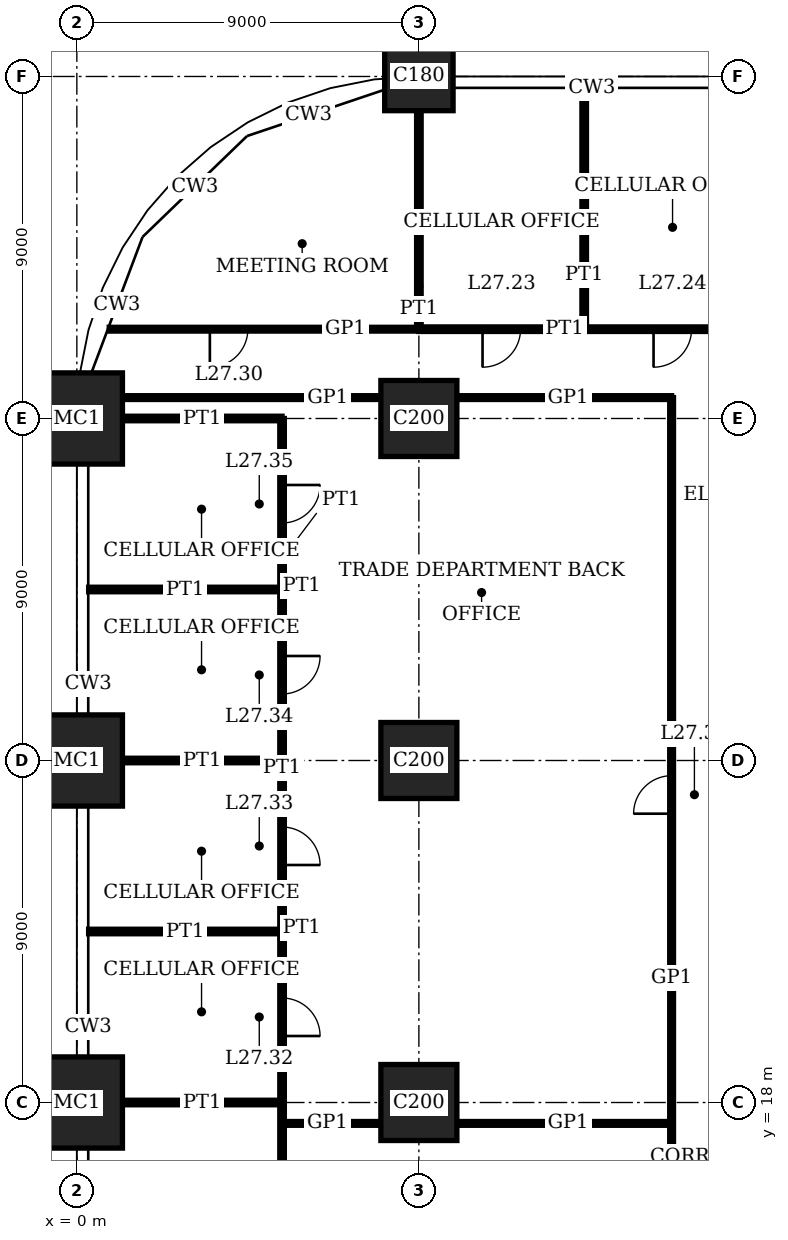
"""IFC4 building model, lengths in metres.
Left out: names, types, materials, properties, quantities, classifications, styles, units other than length and angle.
Written with IfcOpenShell. Run it as: python <this file> out.ifc"""

import sys

from ifc_helpers import new_model, si_unit, direction, frame, frame_2d, origin, origin_2d, place, context, subcontext, project, spatial, rectangle, extrude, element, fill, save


model = new_model("IFC4")
c1 = context("Model", 3, precision=1e-05, world=origin(), true_north=direction((0.0, 1.0)))
c2 = subcontext(c1, "Body", "Model", "MODEL_VIEW")
j1 = project(units=[si_unit("LENGTHUNIT", "METRE"), si_unit("PLANEANGLEUNIT", "RADIAN")], contexts=[c1])
p1 = place(None, origin())
s1 = spatial("IfcSite", under=j1, at=p1, CompositionType="ELEMENT")
p2 = place(p1, origin())
s2 = spatial("IfcBuilding", under=s1, at=p2, CompositionType="ELEMENT")
p3 = place(p2, frame((0.0, 0.0, 113.0)))
s3 = spatial("IfcBuildingStorey", under=s2, at=p3, CompositionType="ELEMENT", Elevation=113.0)
for number, where, z_axis, x_axis in (
    (1, (0.0, 18.0, 0.0), (0.0, 0.0, 1.0), (1.0, 0.0, 0.0)),
    (2, (0.0, 27.0, 0.0), (0.0, 0.0, 1.0), (1.0, 0.0, 0.0)),
    (3, (0.0, 36.0, 0.0), (0.0, 0.0, 1.0), (1.0, 0.0, 0.0)),
):
    element("IfcColumn", number, at=place(p3, frame(where, z_axis=z_axis, x_axis=x_axis)), inside=s3, PredefinedType="COLUMN", context=c2, shape_type="SweptSolid", body=[
        extrude(rectangle(XDim=2.4, YDim=2.4, at=origin_2d()), origin(), (0.0, 0.0, 1.0), 4.0),
    ])
for number, where, z_axis, x_axis in (
    (4, (9.0, 18.0, 0.0), (0.0, 0.0, 1.0), (1.0, 0.0, 0.0)),
    (5, (9.0, 27.0, 0.0), (0.0, 0.0, 1.0), (1.0, 0.0, 0.0)),
    (6, (9.0, 36.0, 0.0), (0.0, 0.0, 1.0), (1.0, 0.0, 0.0)),
):
    element("IfcColumn", number, at=place(p3, frame(where, z_axis=z_axis, x_axis=x_axis)), inside=s3, PredefinedType="COLUMN", context=c2, shape_type="SweptSolid", body=[
        extrude(rectangle(XDim=2.0, YDim=2.0, at=origin_2d()), origin(), (0.0, 0.0, 1.0), 4.0),
    ])
p4 = place(p3, frame((9.0, 45.0, 0.0), z_axis=(0.0, 0.0, 1.0), x_axis=(1.0, 0.0, 0.0)))
e7 = element("IfcColumn", 7, at=p4, inside=s3, PredefinedType="COLUMN", context=c2, shape_type="SweptSolid", body=[
    extrude(rectangle(XDim=1.8, YDim=1.8, at=origin_2d()), origin(), (0.0, 0.0, 1.0), 4.0),
])
p5 = place(p3, frame((5.39, 17.45, 0.0), z_axis=(0.0, 0.0, 1.0), x_axis=(1.0, 0.0, 0.0)))
e8 = element("IfcWall", 8, at=p5, inside=s3, PredefinedType="PARTITIONING", context=c2, shape_type="SweptSolid", body=[
    extrude(rectangle(XDim=2.61, YDim=0.1, at=frame_2d((1.305, 0.0))), origin(), (0.0, 0.0, 1.0), 3.75),
])
p6 = place(p3, frame((10.0, 17.45, 0.0), z_axis=(0.0, 0.0, 1.0), x_axis=(1.0, 0.0, 0.0)))
e9 = element("IfcWall", 9, at=p6, inside=s3, PredefinedType="PARTITIONING", context=c2, shape_type="SweptSolid", body=[
    extrude(rectangle(XDim=5.65, YDim=0.1, at=frame_2d((2.825, 0.0))), origin(), (0.0, 0.0, 1.0), 3.75),
])
p7 = place(p3, frame((1.2, 18.0, 0.0), z_axis=(0.0, 0.0, 1.0), x_axis=(1.0, 0.0, 0.0)))
e10 = element("IfcWall", 10, at=p7, inside=s3, PredefinedType="PARTITIONING", context=c2, shape_type="SweptSolid", body=[
    extrude(rectangle(XDim=4.2, YDim=0.12, at=frame_2d((2.1, 0.0))), origin(), (0.0, 0.0, 1.0), 3.05),
])
p8 = place(p3, frame((0.31, 22.5, 0.0), z_axis=(0.0, 0.0, 1.0), x_axis=(1.0, 0.0, 0.0)))
e11 = element("IfcWall", 11, at=p8, inside=s3, PredefinedType="PARTITIONING", context=c2, shape_type="SweptSolid", body=[
    extrude(rectangle(XDim=5.09, YDim=0.12, at=frame_2d((2.545, 0.0))), origin(), (0.0, 0.0, 1.0), 3.1),
])
p9 = place(p3, frame((1.2, 27.0, 0.0), z_axis=(0.0, 0.0, 1.0), x_axis=(1.0, 0.0, 0.0)))
e12 = element("IfcWall", 12, at=p9, inside=s3, PredefinedType="PARTITIONING", context=c2, shape_type="SweptSolid", body=[
    extrude(rectangle(XDim=4.2, YDim=0.12, at=frame_2d((2.1, 0.0))), origin(), (0.0, 0.0, 1.0), 3.05),
])
p10 = place(p3, frame((0.31, 31.5, 0.0), z_axis=(0.0, 0.0, 1.0), x_axis=(1.0, 0.0, 0.0)))
e13 = element("IfcWall", 13, at=p10, inside=s3, PredefinedType="PARTITIONING", context=c2, shape_type="SweptSolid", body=[
    extrude(rectangle(XDim=5.09, YDim=0.12, at=frame_2d((2.545, 0.0))), origin(), (0.0, 0.0, 1.0), 3.1),
])
p11 = place(p3, frame((1.2, 36.0, 0.0), z_axis=(0.0, 0.0, 1.0), x_axis=(1.0, 0.0, 0.0)))
e14 = element("IfcWall", 14, at=p11, inside=s3, PredefinedType="PARTITIONING", context=c2, shape_type="SweptSolid", body=[
    extrude(rectangle(XDim=4.2, YDim=0.12, at=frame_2d((2.1, 0.0))), origin(), (0.0, 0.0, 1.0), 3.05),
])
p12 = place(p3, frame((1.2, 36.55, 0.0), z_axis=(0.0, 0.0, 1.0), x_axis=(1.0, 0.0, 0.0)))
e15 = element("IfcWall", 15, at=p12, inside=s3, PredefinedType="PARTITIONING", context=c2, shape_type="SweptSolid", body=[
    extrude(rectangle(XDim=6.8, YDim=0.1, at=frame_2d((3.4, 0.0))), origin(), (0.0, 0.0, 1.0), 3.75),
])
p13 = place(p3, frame((10.0, 36.55, 0.0), z_axis=(0.0, 0.0, 1.0), x_axis=(1.0, 0.0, 0.0)))
e16 = element("IfcWall", 16, at=p13, inside=s3, PredefinedType="PARTITIONING", context=c2, shape_type="SweptSolid", body=[
    extrude(rectangle(XDim=5.65, YDim=0.1, at=frame_2d((2.825, 0.0))), origin(), (0.0, 0.0, 1.0), 3.75),
])
p14 = place(p3, frame((9.0, 38.35, 0.0), z_axis=(0.0, 0.0, 1.0), x_axis=(1.0, 0.0, 0.0)))
e17 = element("IfcWall", 17, at=p14, inside=s3, PredefinedType="PARTITIONING", context=c2, shape_type="SweptSolid", body=[
    extrude(rectangle(XDim=4.35, YDim=0.12, at=frame_2d((2.175, 0.0))), origin(), (0.0, 0.0, 1.0), 3.75),
])
p15 = place(p14, frame((1.675, 0.0, 0.0)))
e18 = element("IfcOpeningElement", 18, at=p15, cuts=e17, PredefinedType="OPENING", context=c2, shape_type="SweptSolid", body=[
    extrude(rectangle(XDim=1.0, YDim=2.4, at=frame_2d((0.5, 1.2))), frame((0.0, 0.07, 0.0), z_axis=(0.0, -1.0, 0.0), x_axis=(1.0, 0.0, 0.0)), (0.0, 0.0, 1.0), 0.14),
])
p16 = place(p3, frame((13.35, 38.35, 0.0), z_axis=(0.0, 0.0, 1.0), x_axis=(1.0, 0.0, 0.0)))
e19 = element("IfcWall", 19, at=p16, inside=s3, PredefinedType="PARTITIONING", context=c2, shape_type="SweptSolid", body=[
    extrude(rectangle(XDim=4.65, YDim=0.12, at=frame_2d((2.325, 0.0))), origin(), (0.0, 0.0, 1.0), 3.75),
])
p17 = place(p16, frame((1.825, 0.0, 0.0)))
e20 = element("IfcOpeningElement", 20, at=p17, cuts=e19, PredefinedType="OPENING", context=c2, shape_type="SweptSolid", body=[
    extrude(rectangle(XDim=1.0, YDim=2.4, at=frame_2d((0.5, 1.2))), frame((0.0, 0.07, 0.0), z_axis=(0.0, -1.0, 0.0), x_axis=(1.0, 0.0, 0.0)), (0.0, 0.0, 1.0), 0.14),
])
p18 = place(p3, frame((0.852, 38.35, 0.0), z_axis=(0.0, 0.0, 1.0), x_axis=(1.0, 0.0, 0.0)))
e21 = element("IfcWall", 21, at=p18, inside=s3, PredefinedType="PARTITIONING", context=c2, shape_type="SweptSolid", body=[
    extrude(rectangle(XDim=8.148, YDim=0.1, at=frame_2d((4.074, 0.0))), origin(), (0.0, 0.0, 1.0), 3.75),
])
p19 = place(p18, frame((2.648, 0.0, 0.0)))
e22 = element("IfcOpeningElement", 22, at=p19, cuts=e21, PredefinedType="OPENING", context=c2, shape_type="SweptSolid", body=[
    extrude(rectangle(XDim=1.0, YDim=2.4, at=frame_2d((0.5, 1.2))), frame((0.0, 0.06, 0.0), z_axis=(0.0, -1.0, 0.0), x_axis=(1.0, 0.0, 0.0)), (0.0, 0.0, 1.0), 0.12),
])
p20 = place(p3, frame((5.4, 9.0, 0.0), z_axis=(0.0, 0.0, 1.0), x_axis=(0.0, 1.0, 0.0)))
e23 = element("IfcWall", 23, at=p20, inside=s3, PredefinedType="PARTITIONING", context=c2, shape_type="SweptSolid", body=[
    extrude(rectangle(XDim=9.0, YDim=0.12, at=frame_2d((4.5, 0.0))), origin(), (0.0, 0.0, 1.0), 3.75),
])
p21 = place(p20, frame((4.0, 0.0, 0.0)))
e24 = element("IfcOpeningElement", 24, at=p21, cuts=e23, PredefinedType="OPENING", context=c2, shape_type="SweptSolid", body=[
    extrude(rectangle(XDim=1.0, YDim=2.4, at=frame_2d((0.5, 1.2))), frame((0.0, 0.07, 0.0), z_axis=(0.0, -1.0, 0.0), x_axis=(1.0, 0.0, 0.0)), (0.0, 0.0, 1.0), 0.14),
])
p22 = place(p3, frame((5.4, 18.0, 0.0), z_axis=(0.0, 0.0, 1.0), x_axis=(0.0, 1.0, 0.0)))
e25 = element("IfcWall", 25, at=p22, inside=s3, PredefinedType="PARTITIONING", context=c2, shape_type="SweptSolid", body=[
    extrude(rectangle(XDim=4.5, YDim=0.12, at=frame_2d((2.25, 0.0))), origin(), (0.0, 0.0, 1.0), 3.75),
])
p23 = place(p22, frame((1.75, 0.0, 0.0)))
e26 = element("IfcOpeningElement", 26, at=p23, cuts=e25, PredefinedType="OPENING", context=c2, shape_type="SweptSolid", body=[
    extrude(rectangle(XDim=1.0, YDim=2.4, at=frame_2d((0.5, 1.2))), frame((0.0, 0.07, 0.0), z_axis=(0.0, -1.0, 0.0), x_axis=(1.0, 0.0, 0.0)), (0.0, 0.0, 1.0), 0.14),
])
p24 = place(p3, frame((5.4, 22.5, 0.0), z_axis=(0.0, 0.0, 1.0), x_axis=(0.0, 1.0, 0.0)))
e27 = element("IfcWall", 27, at=p24, inside=s3, PredefinedType="PARTITIONING", context=c2, shape_type="SweptSolid", body=[
    extrude(rectangle(XDim=4.5, YDim=0.12, at=frame_2d((2.25, 0.0))), origin(), (0.0, 0.0, 1.0), 3.75),
])
p25 = place(p24, frame((1.75, 0.0, 0.0)))
e28 = element("IfcOpeningElement", 28, at=p25, cuts=e27, PredefinedType="OPENING", context=c2, shape_type="SweptSolid", body=[
    extrude(rectangle(XDim=1.0, YDim=2.4, at=frame_2d((0.5, 1.2))), frame((0.0, 0.07, 0.0), z_axis=(0.0, -1.0, 0.0), x_axis=(1.0, 0.0, 0.0)), (0.0, 0.0, 1.0), 0.14),
])
p26 = place(p3, frame((5.4, 27.0, 0.0), z_axis=(0.0, 0.0, 1.0), x_axis=(0.0, 1.0, 0.0)))
e29 = element("IfcWall", 29, at=p26, inside=s3, PredefinedType="PARTITIONING", context=c2, shape_type="SweptSolid", body=[
    extrude(rectangle(XDim=4.5, YDim=0.12, at=frame_2d((2.25, 0.0))), origin(), (0.0, 0.0, 1.0), 3.75),
])
p27 = place(p26, frame((1.75, 0.0, 0.0)))
e30 = element("IfcOpeningElement", 30, at=p27, cuts=e29, PredefinedType="OPENING", context=c2, shape_type="SweptSolid", body=[
    extrude(rectangle(XDim=1.0, YDim=2.4, at=frame_2d((0.5, 1.2))), frame((0.0, 0.07, 0.0), z_axis=(0.0, -1.0, 0.0), x_axis=(1.0, 0.0, 0.0)), (0.0, 0.0, 1.0), 0.14),
])
p28 = place(p3, frame((5.4, 31.5, 0.0), z_axis=(0.0, 0.0, 1.0), x_axis=(0.0, 1.0, 0.0)))
e31 = element("IfcWall", 31, at=p28, inside=s3, PredefinedType="PARTITIONING", context=c2, shape_type="SweptSolid", body=[
    extrude(rectangle(XDim=4.5, YDim=0.12, at=frame_2d((2.25, 0.0))), origin(), (0.0, 0.0, 1.0), 3.75),
])
p29 = place(p28, frame((1.75, 0.0, 0.0)))
e32 = element("IfcOpeningElement", 32, at=p29, cuts=e31, PredefinedType="OPENING", context=c2, shape_type="SweptSolid", body=[
    extrude(rectangle(XDim=1.0, YDim=2.4, at=frame_2d((0.5, 1.2))), frame((0.0, 0.07, 0.0), z_axis=(0.0, -1.0, 0.0), x_axis=(1.0, 0.0, 0.0)), (0.0, 0.0, 1.0), 0.14),
])
p30 = place(p3, frame((9.0, 38.35, 0.0), z_axis=(0.0, 0.0, 1.0), x_axis=(0.0, 1.0, 0.0)))
e33 = element("IfcWall", 33, at=p30, inside=s3, PredefinedType="PARTITIONING", context=c2, shape_type="SweptSolid", body=[
    extrude(rectangle(XDim=5.75, YDim=0.12, at=frame_2d((2.875, 0.0))), origin(), (0.0, 0.0, 1.0), 3.05),
])
p31 = place(p3, frame((13.35, 38.35, 0.0), z_axis=(0.0, 0.0, 1.0), x_axis=(0.0, 1.0, 0.0)))
e34 = element("IfcWall", 34, at=p31, inside=s3, PredefinedType="PARTITIONING", context=c2, shape_type="SweptSolid", body=[
    extrude(rectangle(XDim=6.34, YDim=0.12, at=frame_2d((3.17, 0.0))), origin(), (0.0, 0.0, 1.0), 3.75),
])
p32 = place(p3, frame((15.65, 15.65, 0.0), z_axis=(0.0, 0.0, 1.0), x_axis=(0.0, 1.0, 0.0)))
e35 = element("IfcWall", 35, at=p32, inside=s3, PredefinedType="PARTITIONING", context=c2, shape_type="SweptSolid", body=[
    extrude(rectangle(XDim=20.9, YDim=0.1, at=frame_2d((10.45, 0.0))), origin(), (0.0, 0.0, 1.0), 3.75),
])
p33 = place(p32, frame((9.95, 0.0, 0.0)))
e36 = element("IfcOpeningElement", 36, at=p33, cuts=e35, PredefinedType="OPENING", context=c2, shape_type="SweptSolid", body=[
    extrude(rectangle(XDim=1.0, YDim=2.4, at=frame_2d((0.5, 1.2))), frame((0.0, 0.06, 0.0), z_axis=(0.0, -1.0, 0.0), x_axis=(1.0, 0.0, 0.0)), (0.0, 0.0, 1.0), 0.12),
])
p34 = place(p15, origin())
e37 = element("IfcDoor", 37, at=p34, inside=s3, OperationType="SINGLE_SWING_LEFT", PredefinedType="DOOR", context=c2, shape_type="SweptSolid", body=[
    extrude(rectangle(XDim=1.0, YDim=2.4, at=frame_2d((0.5, 1.2))), frame((0.0, 0.025, 0.0), z_axis=(0.0, -1.0, 0.0), x_axis=(1.0, 0.0, 0.0)), (0.0, 0.0, 1.0), 0.05),
])
fill(e18, e37)
p35 = place(p17, origin())
e38 = element("IfcDoor", 38, at=p35, inside=s3, OperationType="SINGLE_SWING_LEFT", PredefinedType="DOOR", context=c2, shape_type="SweptSolid", body=[
    extrude(rectangle(XDim=1.0, YDim=2.4, at=frame_2d((0.5, 1.2))), frame((0.0, 0.025, 0.0), z_axis=(0.0, -1.0, 0.0), x_axis=(1.0, 0.0, 0.0)), (0.0, 0.0, 1.0), 0.05),
])
fill(e20, e38)
p36 = place(p19, origin())
e39 = element("IfcDoor", 39, at=p36, inside=s3, OperationType="SINGLE_SWING_LEFT", PredefinedType="DOOR", context=c2, shape_type="SweptSolid", body=[
    extrude(rectangle(XDim=1.0, YDim=2.4, at=frame_2d((0.5, 1.2))), frame((0.0, 0.02, 0.0), z_axis=(0.0, -1.0, 0.0), x_axis=(1.0, 0.0, 0.0)), (0.0, 0.0, 1.0), 0.04),
])
fill(e22, e39)
p37 = place(p23, origin())
e40 = element("IfcDoor", 40, at=p37, inside=s3, OperationType="SINGLE_SWING_LEFT", PredefinedType="DOOR", context=c2, shape_type="SweptSolid", body=[
    extrude(rectangle(XDim=1.0, YDim=2.4, at=frame_2d((0.5, 1.2))), frame((0.0, 0.025, 0.0), z_axis=(0.0, -1.0, 0.0), x_axis=(1.0, 0.0, 0.0)), (0.0, 0.0, 1.0), 0.05),
])
fill(e26, e40)
p38 = place(p25, origin())
e41 = element("IfcDoor", 41, at=p38, inside=s3, OperationType="SINGLE_SWING_LEFT", PredefinedType="DOOR", context=c2, shape_type="SweptSolid", body=[
    extrude(rectangle(XDim=1.0, YDim=2.4, at=frame_2d((0.5, 1.2))), frame((0.0, 0.025, 0.0), z_axis=(0.0, -1.0, 0.0), x_axis=(1.0, 0.0, 0.0)), (0.0, 0.0, 1.0), 0.05),
])
fill(e28, e41)
p39 = place(p27, origin())
e42 = element("IfcDoor", 42, at=p39, inside=s3, OperationType="SINGLE_SWING_RIGHT", PredefinedType="DOOR", context=c2, shape_type="SweptSolid", body=[
    extrude(rectangle(XDim=1.0, YDim=2.4, at=frame_2d((0.5, 1.2))), frame((0.0, 0.025, 0.0), z_axis=(0.0, -1.0, 0.0), x_axis=(1.0, 0.0, 0.0)), (0.0, 0.0, 1.0), 0.05),
])
fill(e30, e42)
p40 = place(p29, origin())
e43 = element("IfcDoor", 43, at=p40, inside=s3, OperationType="SINGLE_SWING_RIGHT", PredefinedType="DOOR", context=c2, shape_type="SweptSolid", body=[
    extrude(rectangle(XDim=1.0, YDim=2.4, at=frame_2d((0.5, 1.2))), frame((0.0, 0.025, 0.0), z_axis=(0.0, -1.0, 0.0), x_axis=(1.0, 0.0, 0.0)), (0.0, 0.0, 1.0), 0.05),
])
fill(e32, e43)
p41 = place(p33, origin())
e44 = element("IfcDoor", 44, at=p41, inside=s3, OperationType="SINGLE_SWING_RIGHT", PredefinedType="DOOR", context=c2, shape_type="SweptSolid", body=[
    extrude(rectangle(XDim=1.0, YDim=2.4, at=frame_2d((0.5, 1.2))), frame((0.0, 0.02, 0.0), z_axis=(0.0, -1.0, 0.0), x_axis=(1.0, 0.0, 0.0)), (0.0, 0.0, 1.0), 0.04),
])
fill(e36, e44)
save(model, sys.argv[1])
